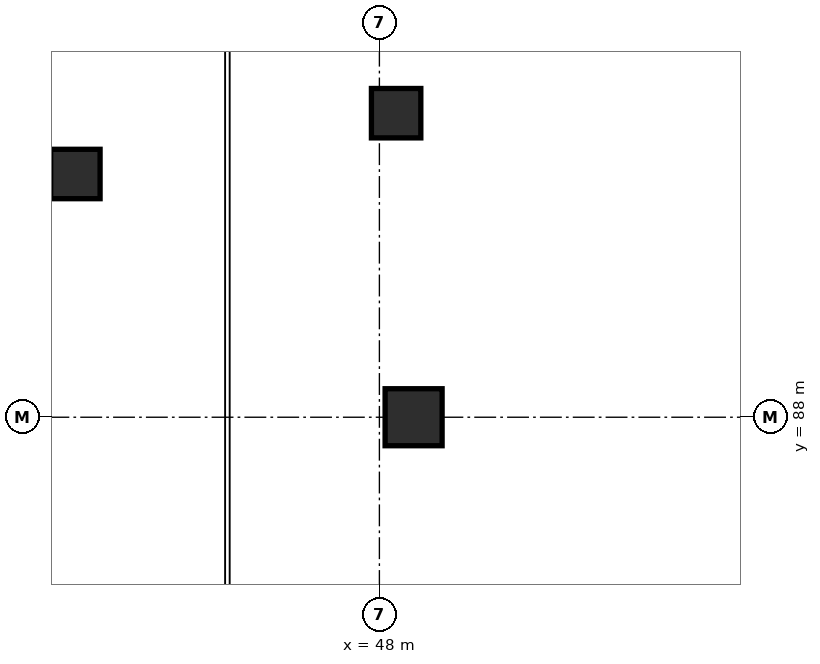
"""IFC4 building model, lengths in metres.
Left out: names, types, materials, properties, quantities, classifications, styles, units other than length and angle.
Written with IfcOpenShell. Run it as: python <this file> out.ifc"""

import sys

from ifc_helpers import new_model, si_unit, direction, frame, origin, origin_2d, place, context, subcontext, project, spatial, rectangle, extrude, element, save


model = new_model("IFC4")
c1 = context("Model", 3, precision=1e-05, world=origin(), true_north=direction((0.0, 1.0)))
c2 = subcontext(c1, "Body", "Model", "MODEL_VIEW")
j1 = project(units=[si_unit("LENGTHUNIT", "METRE"), si_unit("PLANEANGLEUNIT", "RADIAN")], contexts=[c1])
p1 = place(None, origin())
s1 = spatial("IfcSite", under=j1, at=p1, CompositionType="ELEMENT")
p2 = place(p1, origin())
s2 = spatial("IfcBuilding", under=s1, at=p2, CompositionType="ELEMENT")
p3 = place(p2, frame((0.0, 0.0, -3.84)))
s3 = spatial("IfcBuildingStorey", under=s2, at=p3, CompositionType="ELEMENT", Elevation=-3.84)
for number, where, z_axis, x_axis in (
    (1, (44.0, 91.2, 0.0), (0.0, 0.0, 1.0), (1.0, 0.0, 0.0)),
    (2, (48.22, 92.0, 0.0), (0.0, 0.0, 1.0), (1.0, 0.0, 0.0)),
):
    element("IfcColumn", number, at=place(p3, frame(where, z_axis=z_axis, x_axis=x_axis)), inside=s3, PredefinedType="COLUMN", context=c2, shape_type="SweptSolid", body=[
        extrude(rectangle(XDim=0.65, YDim=0.65, at=origin_2d()), origin(), (0.0, 0.0, 1.0), 3.84),
    ])
p4 = place(p3, frame((48.45, 88.0, 0.0), z_axis=(0.0, 0.0, 1.0), x_axis=(1.0, 0.0, 0.0)))
e3 = element("IfcColumn", 3, at=p4, inside=s3, PredefinedType="COLUMN", context=c2, shape_type="SweptSolid", body=[
    extrude(rectangle(XDim=0.75, YDim=0.75, at=origin_2d()), origin(), (0.0, 0.0, 1.0), 3.84),
])
save(model, sys.argv[1])
